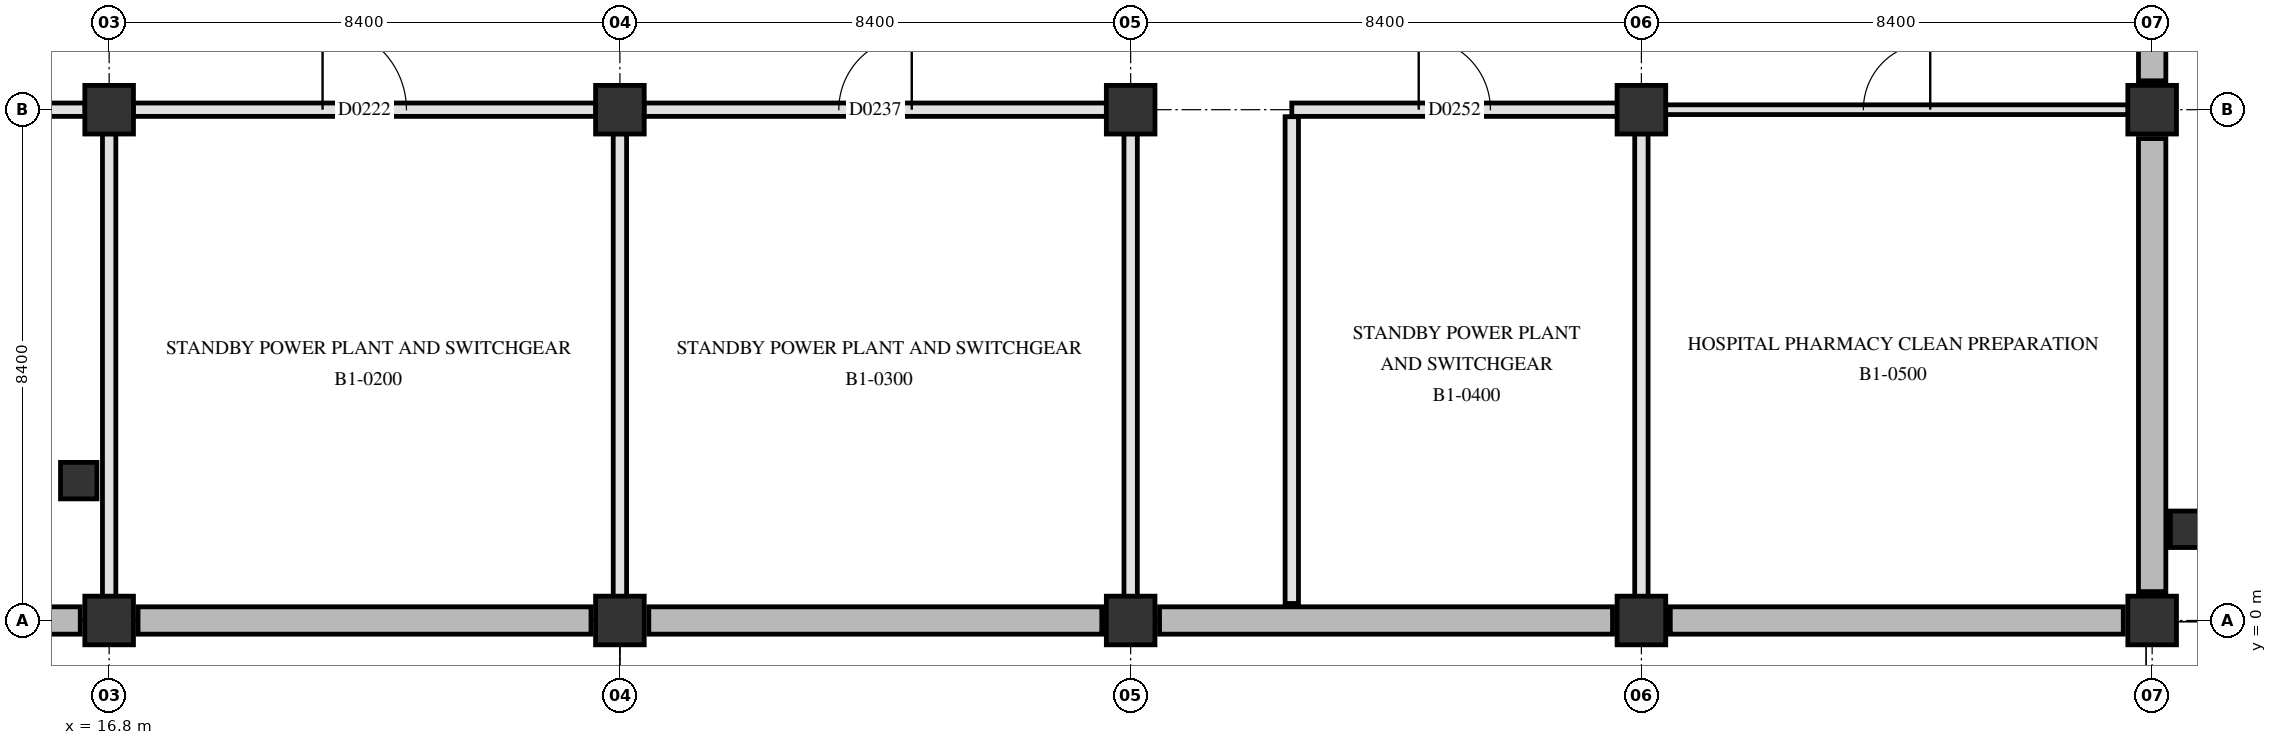
"""IFC4 building model, lengths in metres.
Left out: names, types, materials, properties, quantities, classifications, styles, units other than length and angle.
Written with IfcOpenShell. Run it as: python <this file> out.ifc"""

import sys

from ifc_helpers import new_model, si_unit, direction, frame, frame_2d, origin, origin_2d, place, context, subcontext, project, spatial, rectangle, extrude, element, fill, save


model = new_model("IFC4")
c1 = context("Model", 3, precision=1e-05, world=origin(), true_north=direction((0.0, 1.0)))
c2 = subcontext(c1, "Body", "Model", "MODEL_VIEW")
j1 = project(units=[si_unit("LENGTHUNIT", "METRE"), si_unit("PLANEANGLEUNIT", "RADIAN")], contexts=[c1])
p1 = place(None, origin())
s1 = spatial("IfcSite", under=j1, at=p1, CompositionType="ELEMENT")
p2 = place(p1, origin())
s2 = spatial("IfcBuilding", under=s1, at=p2, CompositionType="ELEMENT")
p3 = place(p2, frame((0.0, 0.0, -5.4)))
s3 = spatial("IfcBuildingStorey", under=s2, at=p3, CompositionType="ELEMENT", Elevation=-5.4)
for number, where, z_axis, x_axis in (
    (1, (16.8, 0.0, 0.0), (0.0, 0.0, 1.0), (1.0, 0.0, 0.0)),
    (2, (16.8, 8.4, 0.0), (0.0, 0.0, 1.0), (1.0, 0.0, 0.0)),
    (3, (25.2, 0.0, 0.0), (0.0, 0.0, 1.0), (1.0, 0.0, 0.0)),
    (4, (25.2, 8.4, 0.0), (0.0, 0.0, 1.0), (1.0, 0.0, 0.0)),
    (5, (33.6, 0.0, 0.0), (0.0, 0.0, 1.0), (1.0, 0.0, 0.0)),
    (6, (33.6, 8.4, 0.0), (0.0, 0.0, 1.0), (1.0, 0.0, 0.0)),
    (7, (42.0, 0.0, 0.0), (0.0, 0.0, 1.0), (1.0, 0.0, 0.0)),
    (8, (42.0, 8.4, 0.0), (0.0, 0.0, 1.0), (1.0, 0.0, 0.0)),
    (9, (50.4, 0.0, 0.0), (0.0, 0.0, 1.0), (1.0, 0.0, 0.0)),
    (10, (50.4, 8.4, 0.0), (0.0, 0.0, 1.0), (1.0, 0.0, 0.0)),
):
    element("IfcColumn", number, at=place(p3, frame(where, z_axis=z_axis, x_axis=x_axis)), inside=s3, PredefinedType="COLUMN", context=c2, shape_type="SweptSolid", body=[
        extrude(rectangle(XDim=0.8, YDim=0.8, at=origin_2d()), origin(), (0.0, 0.0, 1.0), 5.4),
    ])
for number, where, z_axis, x_axis in (
    (11, (50.4, 16.325, 0.0), (0.0, 0.0, 1.0), (0.0, -1.0, 0.0)),
    (12, (50.4, 7.925, 0.0), (0.0, 0.0, 1.0), (0.0, -1.0, 0.0)),
    (13, (49.925, 0.0, 0.0), (0.0, 0.0, 1.0), (-1.0, 0.0, 0.0)),
    (14, (41.525, 0.0, 0.0), (0.0, 0.0, 1.0), (-1.0, 0.0, 0.0)),
    (15, (33.125, 0.0, 0.0), (0.0, 0.0, 1.0), (-1.0, 0.0, 0.0)),
):
    element("IfcWall", number, at=place(p3, frame(where, z_axis=z_axis, x_axis=x_axis)), inside=s3, PredefinedType="SOLIDWALL", context=c2, shape_type="SweptSolid", body=[
        extrude(rectangle(XDim=7.45, YDim=0.45, at=frame_2d((3.725, 0.0))), origin(), (0.0, 0.0, 1.0), 5.08),
    ])
p4 = place(p3, frame((24.725, 0.0, 0.0), z_axis=(0.0, 0.0, 1.0), x_axis=(-1.0, 0.0, 0.0)))
e16 = element("IfcWall", 16, at=p4, inside=s3, PredefinedType="SOLIDWALL", context=c2, shape_type="SweptSolid", body=[
    extrude(rectangle(XDim=7.45, YDim=0.45, at=frame_2d((3.725, 0.0))), origin(), (0.0, 0.0, 1.0), 5.08),
])
p5 = place(p3, frame((16.325, 0.0, 0.0), z_axis=(0.0, 0.0, 1.0), x_axis=(-1.0, 0.0, 0.0)))
e17 = element("IfcWall", 17, at=p5, inside=s3, PredefinedType="SOLIDWALL", context=c2, shape_type="SweptSolid", body=[
    extrude(rectangle(XDim=7.45, YDim=0.45, at=frame_2d((3.725, 0.0))), origin(), (0.0, 0.0, 1.0), 5.08),
])
p6 = place(p3, frame((51.0, 1.5, 0.0), z_axis=(0.0, 0.0, 1.0), x_axis=(1.0, 0.0, 0.0)))
e18 = element("IfcColumn", 18, at=p6, inside=s3, PredefinedType="COLUMN", context=c2, shape_type="SweptSolid", body=[
    extrude(rectangle(XDim=0.6, YDim=0.6, at=origin_2d()), origin(), (0.0, 0.0, 1.0), 4.0),
])
p7 = place(p3, frame((16.3, 2.3, 0.0), z_axis=(0.0, 0.0, 1.0), x_axis=(1.0, 0.0, 0.0)))
e19 = element("IfcColumn", 19, at=p7, inside=s3, PredefinedType="COLUMN", context=c2, shape_type="SweptSolid", body=[
    extrude(rectangle(XDim=0.6, YDim=0.6, at=origin_2d()), origin(), (0.0, 0.0, 1.0), 5.09),
])
p8 = place(p3, frame((8.795, 8.4, 0.0), z_axis=(0.0, 0.0, 1.0), x_axis=(1.0, 0.0, 0.0)))
e20 = element("IfcWall", 20, at=p8, inside=s3, PredefinedType="PARTITIONING", context=c2, shape_type="SweptSolid", body=[
    extrude(rectangle(XDim=7.61, YDim=0.22, at=frame_2d((3.805, 0.0))), origin(), (0.0, 0.0, 1.0), 4.42),
])
p9 = place(p8, frame((3.18, 0.0, 0.0)))
e21 = element("IfcOpeningElement", 21, at=p9, cuts=e20, PredefinedType="OPENING", context=c2, shape_type="SweptSolid", body=[
    extrude(rectangle(XDim=1.25, YDim=2.2, at=frame_2d((0.625, 1.1))), frame((0.0, 0.12, 0.0), z_axis=(0.0, -1.0, 0.0), x_axis=(1.0, 0.0, 0.0)), (0.0, 0.0, 1.0), 0.24),
])
p10 = place(p3, frame((17.195, 8.4, 0.0), z_axis=(0.0, 0.0, 1.0), x_axis=(1.0, 0.0, 0.0)))
e22 = element("IfcWall", 22, at=p10, inside=s3, PredefinedType="PARTITIONING", context=c2, shape_type="SweptSolid", body=[
    extrude(rectangle(XDim=7.61, YDim=0.22, at=frame_2d((3.805, 0.0))), origin(), (0.0, 0.0, 1.0), 4.42),
])
p11 = place(p10, frame((3.115, 0.0, 0.0)))
e23 = element("IfcOpeningElement", 23, at=p11, cuts=e22, PredefinedType="OPENING", context=c2, shape_type="SweptSolid", body=[
    extrude(rectangle(XDim=1.38, YDim=2.22, at=frame_2d((0.69, 1.11))), frame((0.0, 0.12, 0.0), z_axis=(0.0, -1.0, 0.0), x_axis=(1.0, 0.0, 0.0)), (0.0, 0.0, 1.0), 0.24),
])
p12 = place(p3, frame((25.595, 8.4, 0.0), z_axis=(0.0, 0.0, 1.0), x_axis=(1.0, 0.0, 0.0)))
e24 = element("IfcWall", 24, at=p12, inside=s3, PredefinedType="PARTITIONING", context=c2, shape_type="SweptSolid", body=[
    extrude(rectangle(XDim=7.61, YDim=0.22, at=frame_2d((3.805, 0.0))), origin(), (0.0, 0.0, 1.0), 4.42),
])
p13 = place(p12, frame((3.205, 0.0, 0.0)))
e25 = element("IfcOpeningElement", 25, at=p13, cuts=e24, PredefinedType="OPENING", context=c2, shape_type="SweptSolid", body=[
    extrude(rectangle(XDim=1.2, YDim=2.15, at=frame_2d((0.6, 1.075))), frame((0.0, 0.12, 0.0), z_axis=(0.0, -1.0, 0.0), x_axis=(1.0, 0.0, 0.0)), (0.0, 0.0, 1.0), 0.24),
])
p14 = place(p3, frame((36.25, 8.4, 0.0), z_axis=(0.0, 0.0, 1.0), x_axis=(1.0, 0.0, 0.0)))
e26 = element("IfcWall", 26, at=p14, inside=s3, PredefinedType="PARTITIONING", context=c2, shape_type="SweptSolid", body=[
    extrude(rectangle(XDim=5.355, YDim=0.22, at=frame_2d((2.677, 0.0))), origin(), (0.0, 0.0, 1.0), 4.42),
])
p15 = place(p14, frame((2.087, 0.0, 0.0)))
e27 = element("IfcOpeningElement", 27, at=p15, cuts=e26, PredefinedType="OPENING", context=c2, shape_type="SweptSolid", body=[
    extrude(rectangle(XDim=1.18, YDim=2.18, at=frame_2d((0.59, 1.09))), frame((0.0, 0.12, 0.0), z_axis=(0.0, -1.0, 0.0), x_axis=(1.0, 0.0, 0.0)), (0.0, 0.0, 1.0), 0.24),
])
p16 = place(p3, frame((42.395, 8.4, 0.0), z_axis=(0.0, 0.0, 1.0), x_axis=(1.0, 0.0, 0.0)))
e28 = element("IfcWall", 28, at=p16, inside=s3, PredefinedType="PARTITIONING", context=c2, shape_type="SweptSolid", body=[
    extrude(rectangle(XDim=7.61, YDim=0.16, at=frame_2d((3.805, 0.0))), origin(), (0.0, 0.0, 1.0), 4.42),
])
p17 = place(p16, frame((3.255, 0.0, 0.0)))
e29 = element("IfcOpeningElement", 29, at=p17, cuts=e28, PredefinedType="OPENING", context=c2, shape_type="SweptSolid", body=[
    extrude(rectangle(XDim=1.1, YDim=2.15, at=frame_2d((0.55, 1.075))), frame((0.0, 0.09, 0.0), z_axis=(0.0, -1.0, 0.0), x_axis=(1.0, 0.0, 0.0)), (0.0, 0.0, 1.0), 0.18),
])
for number, where, z_axis, x_axis in (
    (30, (16.8, 0.395, 0.0), (0.0, 0.0, 1.0), (0.0, 1.0, 0.0)),
    (31, (25.2, 0.395, 0.0), (0.0, 0.0, 1.0), (0.0, 1.0, 0.0)),
    (32, (33.6, 0.395, 0.0), (0.0, 0.0, 1.0), (0.0, 1.0, 0.0)),
):
    element("IfcWall", number, at=place(p3, frame(where, z_axis=z_axis, x_axis=x_axis)), inside=s3, PredefinedType="PARTITIONING", context=c2, shape_type="SweptSolid", body=[
        extrude(rectangle(XDim=7.61, YDim=0.22, at=frame_2d((3.805, 0.0))), origin(), (0.0, 0.0, 1.0), 4.47),
    ])
p18 = place(p3, frame((36.25, 0.28, 0.0), z_axis=(0.0, 0.0, 1.0), x_axis=(0.0, 1.0, 0.0)))
e33 = element("IfcWall", 33, at=p18, inside=s3, PredefinedType="PARTITIONING", context=c2, shape_type="SweptSolid", body=[
    extrude(rectangle(XDim=8.005, YDim=0.22, at=frame_2d((4.002, 0.0))), origin(), (0.0, 0.0, 1.0), 4.42),
])
p19 = place(p3, frame((42.0, 0.395, 0.0), z_axis=(0.0, 0.0, 1.0), x_axis=(0.0, 1.0, 0.0)))
e34 = element("IfcWall", 34, at=p19, inside=s3, PredefinedType="PARTITIONING", context=c2, shape_type="SweptSolid", body=[
    extrude(rectangle(XDim=7.61, YDim=0.22, at=frame_2d((3.805, 0.0))), origin(), (0.0, 0.0, 1.0), 4.47),
])
p20 = place(p11, origin())
e35 = element("IfcDoor", 35, at=p20, inside=s3, OperationType="SINGLE_SWING_LEFT", PredefinedType="DOOR", context=c2, shape_type="SweptSolid", body=[
    extrude(rectangle(XDim=1.38, YDim=2.22, at=frame_2d((0.69, 1.11))), frame((0.0, 0.025, 0.0), z_axis=(0.0, -1.0, 0.0), x_axis=(1.0, 0.0, 0.0)), (0.0, 0.0, 1.0), 0.05),
])
fill(e23, e35)
p21 = place(p13, origin())
e36 = element("IfcDoor", 36, at=p21, inside=s3, OperationType="SINGLE_SWING_RIGHT", PredefinedType="DOOR", context=c2, shape_type="SweptSolid", body=[
    extrude(rectangle(XDim=1.2, YDim=2.15, at=frame_2d((0.6, 1.075))), frame((0.0, 0.025, 0.0), z_axis=(0.0, -1.0, 0.0), x_axis=(1.0, 0.0, 0.0)), (0.0, 0.0, 1.0), 0.05),
])
fill(e25, e36)
p22 = place(p15, origin())
e37 = element("IfcDoor", 37, at=p22, inside=s3, OperationType="SINGLE_SWING_LEFT", PredefinedType="DOOR", context=c2, shape_type="SweptSolid", body=[
    extrude(rectangle(XDim=1.18, YDim=2.18, at=frame_2d((0.59, 1.09))), frame((0.0, 0.025, 0.0), z_axis=(0.0, -1.0, 0.0), x_axis=(1.0, 0.0, 0.0)), (0.0, 0.0, 1.0), 0.05),
])
fill(e27, e37)
p23 = place(p17, origin())
e38 = element("IfcDoor", 38, at=p23, inside=s3, OperationType="SINGLE_SWING_RIGHT", PredefinedType="DOOR", context=c2, shape_type="SweptSolid", body=[
    extrude(rectangle(XDim=1.1, YDim=2.15, at=frame_2d((0.55, 1.075))), frame((0.0, 0.025, 0.0), z_axis=(0.0, -1.0, 0.0), x_axis=(1.0, 0.0, 0.0)), (0.0, 0.0, 1.0), 0.05),
])
fill(e29, e38)
save(model, sys.argv[1])
